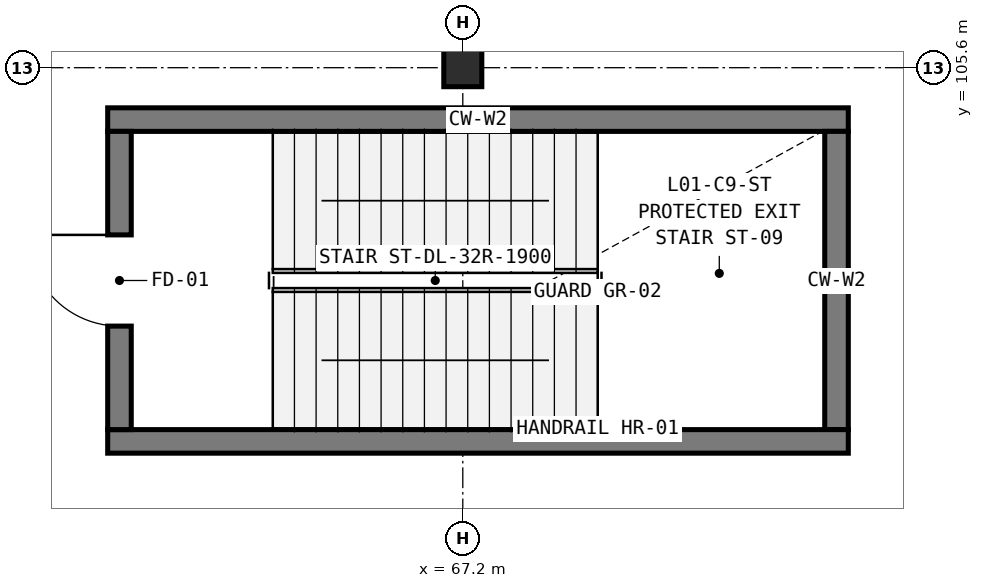
"""IFC4 building model, lengths in metres.
Left out: names, types, materials, properties, quantities, classifications, styles, units other than length and angle.
Written with IfcOpenShell. Run it as: python <this file> out.ifc"""

import sys

from ifc_helpers import new_model, si_unit, direction, frame, frame_2d, origin, origin_2d, place, context, subcontext, project, spatial, rectangle, extrude, element, fill, save


model = new_model("IFC4")
c1 = context("Model", 3, precision=1e-05, world=origin(), true_north=direction((0.0, 1.0)))
c2 = subcontext(c1, "Body", "Model", "MODEL_VIEW")
j1 = project(units=[si_unit("LENGTHUNIT", "METRE"), si_unit("PLANEANGLEUNIT", "RADIAN")], contexts=[c1])
p1 = place(None, origin())
s1 = spatial("IfcSite", under=j1, at=p1, CompositionType="ELEMENT")
p2 = place(p1, origin())
s2 = spatial("IfcBuilding", under=s1, at=p2, CompositionType="ELEMENT")
p3 = place(p2, frame((0.0, 0.0, 6.0)))
s3 = spatial("IfcBuildingStorey", under=s2, at=p3, CompositionType="ELEMENT", Elevation=6.0)
p4 = place(p3, frame((67.2, 105.6, 0.0), z_axis=(0.0, 0.0, 1.0), x_axis=(1.0, 0.0, 0.0)))
e1 = element("IfcColumn", 1, at=p4, inside=s3, PredefinedType="COLUMN", context=c2, shape_type="SweptSolid", body=[
    extrude(rectangle(XDim=0.5, YDim=0.5, at=origin_2d()), origin(), (0.0, 0.0, 1.0), 5.4),
])
p5 = place(p3, frame((62.528, 104.917, 0.0), z_axis=(0.0, 0.0, 1.0), x_axis=(1.0, 0.0, 0.0)))
e2 = element("IfcWall", 2, at=p5, inside=s3, PredefinedType="SHEAR", context=c2, shape_type="SweptSolid", body=[
    extrude(rectangle(XDim=9.744, YDim=0.31, at=frame_2d((4.872, 0.0))), origin(), (0.0, 0.0, 1.0), 5.08),
])
p6 = place(p3, frame((72.117, 104.762, 0.0), z_axis=(0.0, 0.0, 1.0), x_axis=(0.0, -1.0, 0.0)))
e3 = element("IfcWall", 3, at=p6, inside=s3, PredefinedType="SHEAR", context=c2, shape_type="SweptSolid", body=[
    extrude(rectangle(XDim=3.924, YDim=0.31, at=frame_2d((1.962, 0.0))), origin(), (0.0, 0.0, 1.0), 5.08),
])
p7 = place(p3, frame((72.272, 100.683, 0.0), z_axis=(0.0, 0.0, 1.0), x_axis=(-1.0, 0.0, 0.0)))
e4 = element("IfcWall", 4, at=p7, inside=s3, PredefinedType="SHEAR", context=c2, shape_type="SweptSolid", body=[
    extrude(rectangle(XDim=9.744, YDim=0.31, at=frame_2d((4.872, 0.0))), origin(), (0.0, 0.0, 1.0), 5.08),
])
p8 = place(p3, frame((62.683, 100.838, 0.0), z_axis=(0.0, 0.0, 1.0), x_axis=(0.0, 1.0, 0.0)))
e5 = element("IfcWall", 5, at=p8, inside=s3, PredefinedType="SHEAR", context=c2, shape_type="SweptSolid", body=[
    extrude(rectangle(XDim=3.924, YDim=0.31, at=frame_2d((1.962, 0.0))), origin(), (0.0, 0.0, 1.0), 5.08),
])
p9 = place(p8, frame((1.362, 0.0, 0.0)))
e6 = element("IfcOpeningElement", 6, at=p9, cuts=e5, PredefinedType="OPENING", context=c2, shape_type="SweptSolid", body=[
    extrude(rectangle(XDim=1.2, YDim=2.2, at=frame_2d((0.6, 1.1))), frame((0.0, 0.165, 0.0), z_axis=(0.0, -1.0, 0.0), x_axis=(1.0, 0.0, 0.0)), (0.0, 0.0, 1.0), 0.33),
])
p10 = place(p9, origin())
e7 = element("IfcDoor", 7, at=p10, inside=s3, OperationType="SINGLE_SWING_RIGHT", PredefinedType="DOOR", context=c2, shape_type="SweptSolid", body=[
    extrude(rectangle(XDim=1.2, YDim=2.2, at=frame_2d((0.6, 1.1))), frame((0.0, 0.025, 0.0), z_axis=(0.0, -1.0, 0.0), x_axis=(1.0, 0.0, 0.0)), (0.0, 0.0, 1.0), 0.05),
])
fill(e6, e7)
save(model, sys.argv[1])
